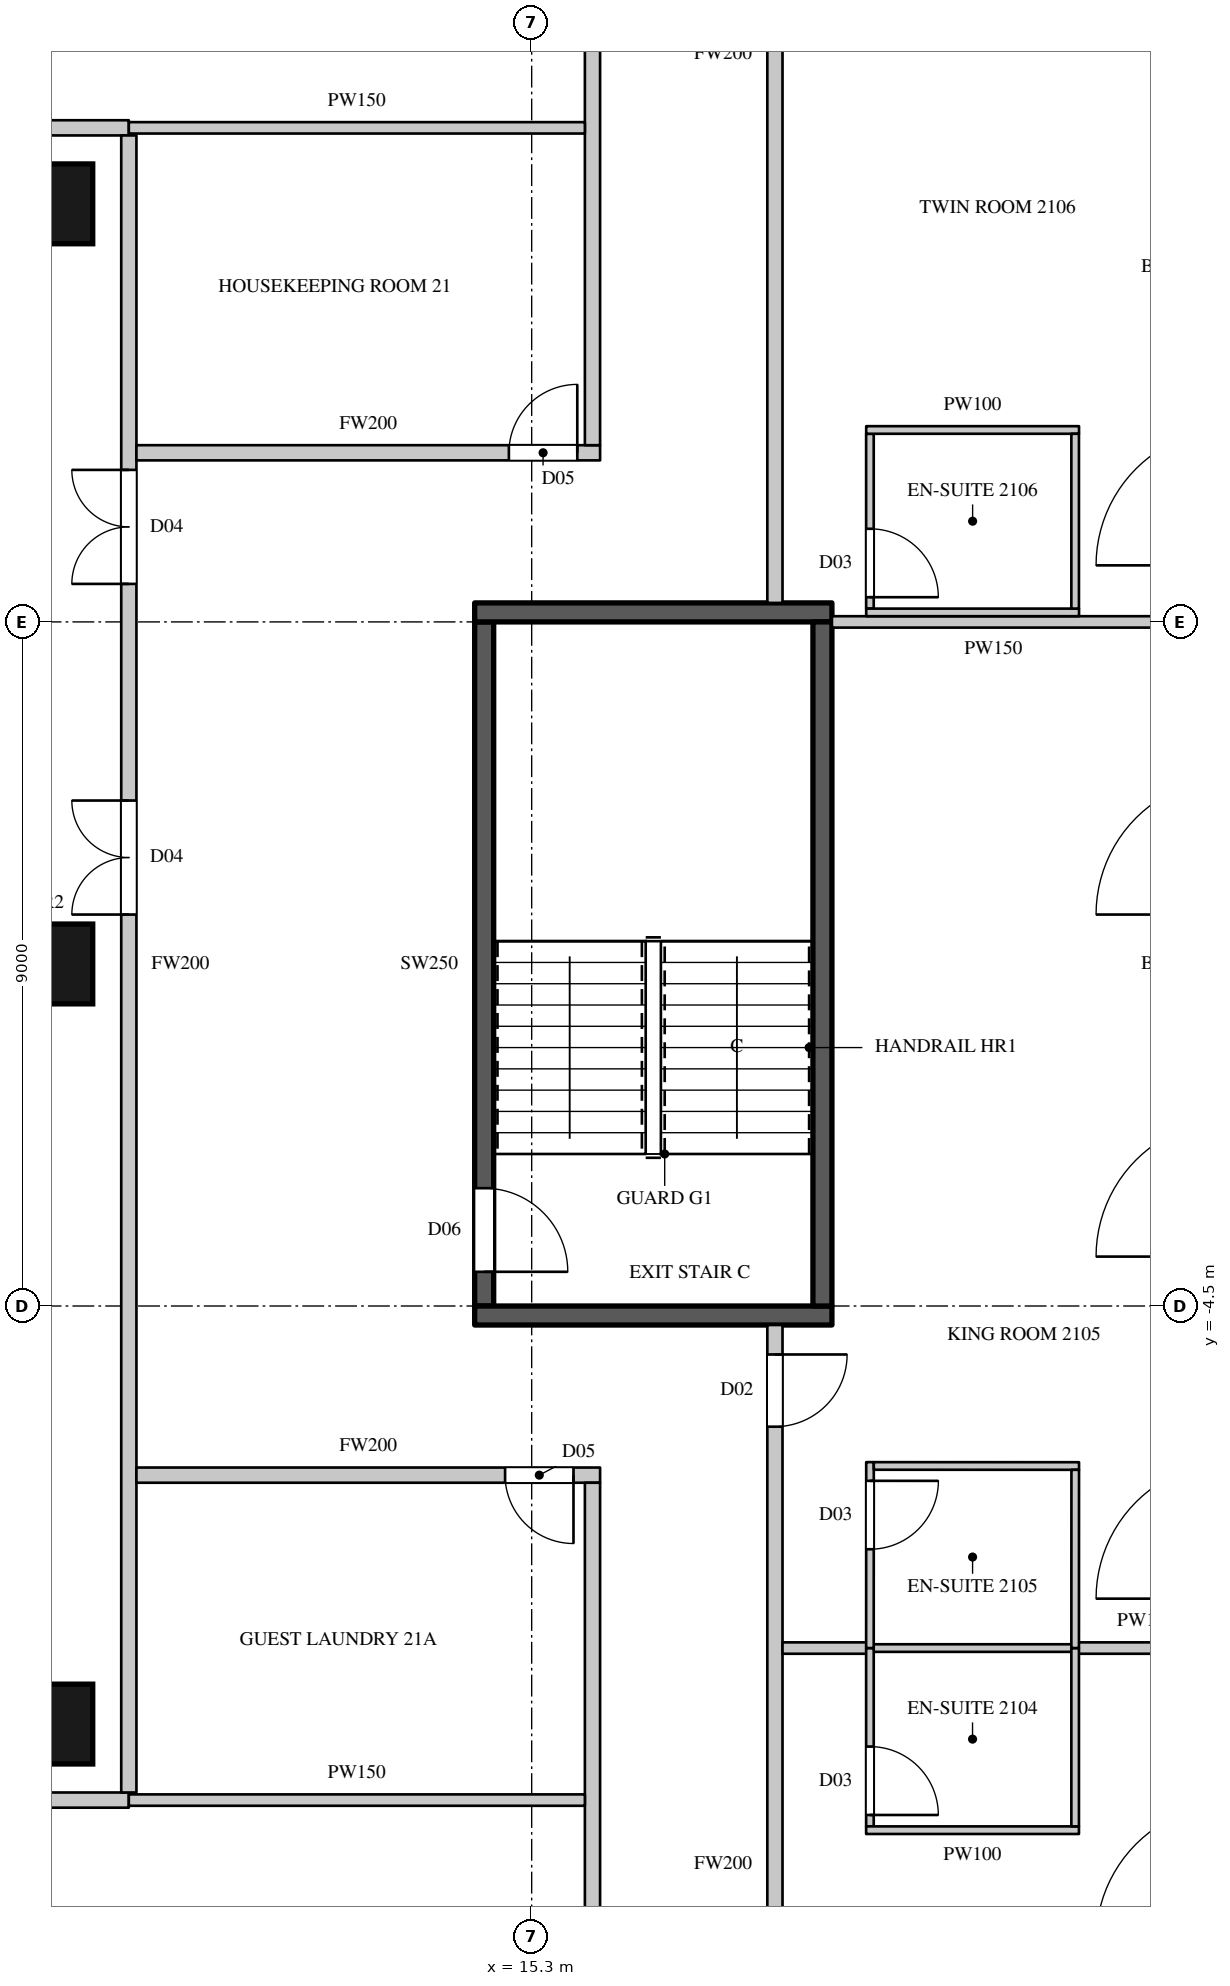
"""IFC4 building model, lengths in metres.
Left out: names, types, materials, properties, quantities, classifications, styles, units other than length and angle.
Written with IfcOpenShell. Run it as: python <this file> out.ifc"""

import sys

from ifc_helpers import new_model, si_unit, direction, frame, frame_2d, origin, origin_2d, place, context, subcontext, project, spatial, rectangle, circle, extrude, element, fill, save


model = new_model("IFC4")
c1 = context("Model", 3, precision=1e-05, world=origin(), true_north=direction((0.0, 1.0)))
c2 = subcontext(c1, "Body", "Model", "MODEL_VIEW")
j1 = project(units=[si_unit("LENGTHUNIT", "METRE"), si_unit("PLANEANGLEUNIT", "RADIAN")], contexts=[c1])
p1 = place(None, origin())
s1 = spatial("IfcSite", under=j1, at=p1, CompositionType="ELEMENT")
p2 = place(p1, origin())
s2 = spatial("IfcBuilding", under=s1, at=p2, CompositionType="ELEMENT")
p3 = place(p2, frame((0.0, 0.0, 105.9)))
s3 = spatial("IfcBuildingStorey", under=s2, at=p3, CompositionType="ELEMENT", Elevation=105.9)
for number, where, z_axis, x_axis in (
    (1, (9.0, -10.0, 0.0), (0.0, 0.0, 1.0), (1.0, 0.0, 0.0)),
    (2, (9.0, 0.0, 0.0), (0.0, 0.0, 1.0), (1.0, 0.0, 0.0)),
    (3, (9.0, 10.0, 0.0), (0.0, 0.0, 1.0), (1.0, 0.0, 0.0)),
):
    element("IfcColumn", number, at=place(p3, frame(where, z_axis=z_axis, x_axis=x_axis)), inside=s3, PredefinedType="COLUMN", context=c2, shape_type="SweptSolid", body=[
        extrude(circle(Radius=0.525, at=origin_2d()), origin(), (0.0, 0.0, 1.0), 3.6),
    ])
p4 = place(p3, frame((-8.1, -11.0, 0.0), z_axis=(0.0, 0.0, 1.0), x_axis=(1.0, 0.0, 0.0)))
e4 = element("IfcWall", 4, at=p4, inside=s3, PredefinedType="PARTITIONING", context=c2, shape_type="SweptSolid", body=[
    extrude(rectangle(XDim=18.1, YDim=0.2, at=frame_2d((9.05, 0.0))), origin(), (0.0, 0.0, 1.0), 3.3),
])
p5 = place(p4, frame((1.65, 0.0, 0.0)))
e5 = element("IfcOpeningElement", 5, at=p5, cuts=e4, PredefinedType="OPENING", context=c2, shape_type="SweptSolid", body=[
    extrude(rectangle(XDim=1.5, YDim=2.2, at=frame_2d((0.75, 1.1))), frame((0.0, 0.11, 0.0), z_axis=(0.0, -1.0, 0.0), x_axis=(1.0, 0.0, 0.0)), (0.0, 0.0, 1.0), 0.22),
])
p6 = place(p3, frame((-7.9, 11.0, 0.0), z_axis=(0.0, 0.0, 1.0), x_axis=(1.0, 0.0, 0.0)))
e6 = element("IfcWall", 6, at=p6, inside=s3, PredefinedType="PARTITIONING", context=c2, shape_type="SweptSolid", body=[
    extrude(rectangle(XDim=17.9, YDim=0.2, at=frame_2d((8.95, 0.0))), origin(), (0.0, 0.0, 1.0), 3.3),
])
p7 = place(p6, frame((6.5, 0.0, 0.0)))
e7 = element("IfcOpeningElement", 7, at=p7, cuts=e6, PredefinedType="OPENING", context=c2, shape_type="SweptSolid", body=[
    extrude(rectangle(XDim=1.5, YDim=2.2, at=frame_2d((0.75, 1.1))), frame((0.0, 0.11, 0.0), z_axis=(0.0, -1.0, 0.0), x_axis=(1.0, 0.0, 0.0)), (0.0, 0.0, 1.0), 0.22),
])
p8 = place(p3, frame((10.0, -10.9, 0.0), z_axis=(0.0, 0.0, 1.0), x_axis=(0.0, 1.0, 0.0)))
e8 = element("IfcWall", 8, at=p8, inside=s3, PredefinedType="PARTITIONING", context=c2, shape_type="SweptSolid", body=[
    extrude(rectangle(XDim=21.8, YDim=0.2, at=frame_2d((10.9, 0.0))), origin(), (0.0, 0.0, 1.0), 3.3),
])
p9 = place(p8, frame((15.9, 0.0, 0.0)))
e9 = element("IfcOpeningElement", 9, at=p9, cuts=e8, PredefinedType="OPENING", context=c2, shape_type="SweptSolid", body=[
    extrude(rectangle(XDim=1.5, YDim=2.2, at=frame_2d((0.75, 1.1))), frame((0.0, 0.11, 0.0), z_axis=(0.0, -1.0, 0.0), x_axis=(1.0, 0.0, 0.0)), (0.0, 0.0, 1.0), 0.22),
])
p10 = place(p8, frame((11.55, 0.0, 0.0)))
e10 = element("IfcOpeningElement", 10, at=p10, cuts=e8, PredefinedType="OPENING", context=c2, shape_type="SweptSolid", body=[
    extrude(rectangle(XDim=1.5, YDim=2.2, at=frame_2d((0.75, 1.1))), frame((0.0, 0.11, 0.0), z_axis=(0.0, -1.0, 0.0), x_axis=(1.0, 0.0, 0.0)), (0.0, 0.0, 1.0), 0.22),
])
p11 = place(p3, frame((10.1, -6.725, 0.0), z_axis=(0.0, 0.0, 1.0), x_axis=(1.0, 0.0, 0.0)))
e11 = element("IfcWall", 11, at=p11, inside=s3, PredefinedType="PARTITIONING", context=c2, shape_type="SweptSolid", body=[
    extrude(rectangle(XDim=6.1, YDim=0.2, at=frame_2d((3.05, 0.0))), origin(), (0.0, 0.0, 1.0), 3.3),
])
p12 = place(p11, frame((4.85, 0.0, 0.0)))
e12 = element("IfcOpeningElement", 12, at=p12, cuts=e11, PredefinedType="OPENING", context=c2, shape_type="SweptSolid", body=[
    extrude(rectangle(XDim=0.9, YDim=2.2, at=frame_2d((0.45, 1.1))), frame((0.0, 0.11, 0.0), z_axis=(0.0, -1.0, 0.0), x_axis=(1.0, 0.0, 0.0)), (0.0, 0.0, 1.0), 0.22),
])
p13 = place(p3, frame((10.1, 6.725, 0.0), z_axis=(0.0, 0.0, 1.0), x_axis=(1.0, 0.0, 0.0)))
e13 = element("IfcWall", 13, at=p13, inside=s3, PredefinedType="PARTITIONING", context=c2, shape_type="SweptSolid", body=[
    extrude(rectangle(XDim=6.1, YDim=0.2, at=frame_2d((3.05, 0.0))), origin(), (0.0, 0.0, 1.0), 3.3),
])
p14 = place(p13, frame((4.9, 0.0, 0.0)))
e14 = element("IfcOpeningElement", 14, at=p14, cuts=e13, PredefinedType="OPENING", context=c2, shape_type="SweptSolid", body=[
    extrude(rectangle(XDim=0.9, YDim=2.2, at=frame_2d((0.45, 1.1))), frame((0.0, 0.11, 0.0), z_axis=(0.0, -1.0, 0.0), x_axis=(1.0, 0.0, 0.0)), (0.0, 0.0, 1.0), 0.22),
])
for number, where, z_axis, x_axis in (
    (15, (16.1, -17.4, 0.0), (0.0, 0.0, 1.0), (0.0, 1.0, 0.0)),
    (16, (16.1, 6.825, 0.0), (0.0, 0.0, 1.0), (0.0, 1.0, 0.0)),
):
    element("IfcWall", number, at=place(p3, frame(where, z_axis=z_axis, x_axis=x_axis)), inside=s3, PredefinedType="PARTITIONING", context=c2, shape_type="SweptSolid", body=[
        extrude(rectangle(XDim=10.575, YDim=0.2, at=frame_2d((5.288, 0.0))), origin(), (0.0, 0.0, 1.0), 3.3),
    ])
p15 = place(p3, frame((18.5, -18.938, 0.0), z_axis=(0.0, 0.0, 1.0), x_axis=(0.0, 1.0, 0.0)))
e17 = element("IfcWall", 17, at=p15, inside=s3, PredefinedType="PARTITIONING", context=c2, shape_type="SweptSolid", body=[
    extrude(rectangle(XDim=14.188, YDim=0.2, at=frame_2d((7.094, 0.0))), origin(), (0.0, 0.0, 1.0), 3.3),
])
p16 = place(p15, frame((3.45, 0.0, 0.0)))
e18 = element("IfcOpeningElement", 18, at=p16, cuts=e17, PredefinedType="OPENING", context=c2, shape_type="SweptSolid", body=[
    extrude(rectangle(XDim=0.95, YDim=2.2, at=frame_2d((0.475, 1.1))), frame((0.0, 0.11, 0.0), z_axis=(0.0, -1.0, 0.0), x_axis=(1.0, 0.0, 0.0)), (0.0, 0.0, 1.0), 0.22),
])
p17 = place(p15, frame((12.85, 0.0, 0.0)))
e19 = element("IfcOpeningElement", 19, at=p17, cuts=e17, PredefinedType="OPENING", context=c2, shape_type="SweptSolid", body=[
    extrude(rectangle(XDim=0.95, YDim=2.2, at=frame_2d((0.475, 1.1))), frame((0.0, 0.11, 0.0), z_axis=(0.0, -1.0, 0.0), x_axis=(1.0, 0.0, 0.0)), (0.0, 0.0, 1.0), 0.22),
])
p18 = place(p3, frame((18.5, 4.75, 0.0), z_axis=(0.0, 0.0, 1.0), x_axis=(0.0, 1.0, 0.0)))
e20 = element("IfcWall", 20, at=p18, inside=s3, PredefinedType="PARTITIONING", context=c2, shape_type="SweptSolid", body=[
    extrude(rectangle(XDim=14.434, YDim=0.2, at=frame_2d((7.217, 0.0))), origin(), (0.0, 0.0, 1.0), 3.3),
])
p19 = place(p18, frame((7.65, 0.0, 0.0)))
e21 = element("IfcOpeningElement", 21, at=p19, cuts=e20, PredefinedType="OPENING", context=c2, shape_type="SweptSolid", body=[
    extrude(rectangle(XDim=0.95, YDim=2.2, at=frame_2d((0.475, 1.1))), frame((0.0, 0.11, 0.0), z_axis=(0.0, -1.0, 0.0), x_axis=(1.0, 0.0, 0.0)), (0.0, 0.0, 1.0), 0.22),
])
for number, where, z_axis, x_axis in (
    (22, (10.0, -11.0, 0.0), (0.0, 0.0, 1.0), (1.0, 0.0, 0.0)),
    (23, (10.0, 11.0, 0.0), (0.0, 0.0, 1.0), (1.0, 0.0, 0.0)),
):
    element("IfcWall", number, at=place(p3, frame(where, z_axis=z_axis, x_axis=x_axis)), inside=s3, PredefinedType="PARTITIONING", context=c2, shape_type="SweptSolid", body=[
        extrude(rectangle(XDim=6.0, YDim=0.15, at=frame_2d((3.0, 0.0))), origin(), (0.0, 0.0, 1.0), 3.3),
    ])
p20 = place(p3, frame((18.6, -9.0, 0.0), z_axis=(0.0, 0.0, 1.0), x_axis=(1.0, 0.0, 0.0)))
e24 = element("IfcWall", 24, at=p20, inside=s3, PredefinedType="PARTITIONING", context=c2, shape_type="SweptSolid", body=[
    extrude(rectangle(XDim=1.13, YDim=0.15, at=frame_2d((0.565, 0.0))), origin(), (0.0, 0.0, 1.0), 2.65),
])
p21 = place(p3, frame((19.25, 4.5, 0.0), z_axis=(0.0, 0.0, 1.0), x_axis=(1.0, 0.0, 0.0)))
e25 = element("IfcWall", 25, at=p21, inside=s3, PredefinedType="PARTITIONING", context=c2, shape_type="SweptSolid", body=[
    extrude(rectangle(XDim=4.25, YDim=0.15, at=frame_2d((2.125, 0.0))), origin(), (0.0, 0.0, 1.0), 3.3),
])
p22 = place(p3, frame((22.47, -9.0, 0.0), z_axis=(0.0, 0.0, 1.0), x_axis=(1.0, 0.0, 0.0)))
e26 = element("IfcWall", 26, at=p22, inside=s3, PredefinedType="PARTITIONING", context=c2, shape_type="SweptSolid", body=[
    extrude(rectangle(XDim=1.83, YDim=0.15, at=frame_2d((0.915, 0.0))), origin(), (0.0, 0.0, 1.0), 2.65),
])
p23 = place(p3, frame((14.675, -4.5, 0.0), z_axis=(0.0, 0.0, 1.0), x_axis=(0.0, 1.0, 0.0)))
e27 = element("IfcWall", 27, at=p23, inside=s3, PredefinedType="SHEAR", context=c2, shape_type="SweptSolid", body=[
    extrude(rectangle(XDim=9.0, YDim=0.25, at=frame_2d((4.5, 0.0))), origin(), (0.0, 0.0, 1.0), 3.3),
])
p24 = place(p23, frame((0.45, 0.0, 0.0)))
e28 = element("IfcOpeningElement", 28, at=p24, cuts=e27, PredefinedType="OPENING", context=c2, shape_type="SweptSolid", body=[
    extrude(rectangle(XDim=1.1, YDim=2.2, at=frame_2d((0.55, 1.1))), frame((0.0, 0.135, 0.0), z_axis=(0.0, -1.0, 0.0), x_axis=(1.0, 0.0, 0.0)), (0.0, 0.0, 1.0), 0.27),
])
for number, where, z_axis, x_axis in (
    (29, (14.55, -4.625, 0.0), (0.0, 0.0, 1.0), (1.0, 0.0, 0.0)),
    (30, (14.55, 4.625, 0.0), (0.0, 0.0, 1.0), (1.0, 0.0, 0.0)),
):
    element("IfcWall", number, at=place(p3, frame(where, z_axis=z_axis, x_axis=x_axis)), inside=s3, PredefinedType="SHEAR", context=c2, shape_type="SweptSolid", body=[
        extrude(rectangle(XDim=4.7, YDim=0.25, at=frame_2d((2.35, 0.0))), origin(), (0.0, 0.0, 1.0), 3.3),
    ])
p25 = place(p3, frame((19.125, -4.5, 0.0), z_axis=(0.0, 0.0, 1.0), x_axis=(0.0, 1.0, 0.0)))
e31 = element("IfcWall", 31, at=p25, inside=s3, PredefinedType="SHEAR", context=c2, shape_type="SweptSolid", body=[
    extrude(rectangle(XDim=9.0, YDim=0.25, at=frame_2d((4.5, 0.0))), origin(), (0.0, 0.0, 1.0), 3.3),
])
p26 = place(p3, frame((19.73, -9.0, 0.0), z_axis=(0.0, 0.0, 1.0), x_axis=(1.0, 0.0, 0.0)))
e32 = element("IfcWall", 32, at=p26, inside=s3, PredefinedType="PARTITIONING", context=c2, shape_type="SweptSolid", body=[
    extrude(rectangle(XDim=2.74, YDim=0.1, at=frame_2d((1.37, 0.0))), origin(), (0.0, 0.0, 1.0), 2.65),
])
p27 = place(p3, frame((19.75, -11.346, 0.0), z_axis=(0.0, 0.0, 1.0), x_axis=(0.0, 1.0, 0.0)))
e33 = element("IfcWall", 33, at=p27, inside=s3, PredefinedType="PARTITIONING", context=c2, shape_type="SweptSolid", body=[
    extrude(rectangle(XDim=2.346, YDim=0.1, at=frame_2d((1.173, 0.0))), origin(), (0.0, 0.0, 1.0), 3.3),
])
p28 = place(p27, frame((0.15, 0.0, 0.0)))
e34 = element("IfcOpeningElement", 34, at=p28, cuts=e33, PredefinedType="OPENING", context=c2, shape_type="SweptSolid", body=[
    extrude(rectangle(XDim=0.9, YDim=2.2, at=frame_2d((0.45, 1.1))), frame((0.0, 0.06, 0.0), z_axis=(0.0, -1.0, 0.0), x_axis=(1.0, 0.0, 0.0)), (0.0, 0.0, 1.0), 0.12),
])
p29 = place(p3, frame((19.7, -11.396, 0.0), z_axis=(0.0, 0.0, 1.0), x_axis=(1.0, 0.0, 0.0)))
e35 = element("IfcWall", 35, at=p29, inside=s3, PredefinedType="PARTITIONING", context=c2, shape_type="SweptSolid", body=[
    extrude(rectangle(XDim=2.8, YDim=0.1, at=frame_2d((1.4, 0.0))), origin(), (0.0, 0.0, 1.0), 3.3),
])
p30 = place(p3, frame((19.75, -9.0, 0.0), z_axis=(0.0, 0.0, 1.0), x_axis=(0.000399241409, 0.999999920303, 0.0)))
e36 = element("IfcWall", 36, at=p30, inside=s3, PredefinedType="PARTITIONING", context=c2, shape_type="SweptSolid", body=[
    extrude(rectangle(XDim=2.446, YDim=0.1, at=frame_2d((1.223, 0.0))), origin(), (0.0, 0.0, 1.0), 3.3),
])
p31 = place(p30, frame((1.3, 0.0, 0.0)))
e37 = element("IfcOpeningElement", 37, at=p31, cuts=e36, PredefinedType="OPENING", context=c2, shape_type="SweptSolid", body=[
    extrude(rectangle(XDim=0.9, YDim=2.2, at=frame_2d((0.45, 1.1))), frame((0.0, 0.06, 0.0), z_axis=(0.0, -1.0, 0.0), x_axis=(1.0, 0.0, 0.0)), (0.0, 0.0, 1.0), 0.12),
])
p32 = place(p3, frame((19.75, 4.675, 0.0), z_axis=(0.0, 0.0, 1.0), x_axis=(0.0, 1.0, 0.0)))
e38 = element("IfcWall", 38, at=p32, inside=s3, PredefinedType="PARTITIONING", context=c2, shape_type="SweptSolid", body=[
    extrude(rectangle(XDim=2.3, YDim=0.1, at=frame_2d((1.15, 0.0))), origin(), (0.0, 0.0, 1.0), 3.3),
])
p33 = place(p32, frame((0.15, 0.0, 0.0)))
e39 = element("IfcOpeningElement", 39, at=p33, cuts=e38, PredefinedType="OPENING", context=c2, shape_type="SweptSolid", body=[
    extrude(rectangle(XDim=0.9, YDim=2.2, at=frame_2d((0.45, 1.1))), frame((0.0, 0.06, 0.0), z_axis=(0.0, -1.0, 0.0), x_axis=(1.0, 0.0, 0.0)), (0.0, 0.0, 1.0), 0.12),
])
p34 = place(p3, frame((19.801, -6.604, 0.0), z_axis=(0.0, 0.0, 1.0), x_axis=(0.999999934588, -0.000361696332, 0.0)))
e40 = element("IfcWall", 40, at=p34, inside=s3, PredefinedType="PARTITIONING", context=c2, shape_type="SweptSolid", body=[
    extrude(rectangle(XDim=2.7, YDim=0.1, at=frame_2d((1.35, 0.0))), origin(), (0.0, 0.0, 1.0), 3.3),
])
for number, where, z_axis, x_axis in (
    (41, (19.701, 4.625, 0.0), (0.0, 0.0, 1.0), (1.0, 0.0, 0.0)),
    (42, (19.701, 7.025, 0.0), (0.0, 0.0, 1.0), (1.0, 0.0, 0.0)),
):
    element("IfcWall", number, at=place(p3, frame(where, z_axis=z_axis, x_axis=x_axis)), inside=s3, PredefinedType="PARTITIONING", context=c2, shape_type="SweptSolid", body=[
        extrude(rectangle(XDim=2.8, YDim=0.1, at=frame_2d((1.4, 0.0))), origin(), (0.0, 0.0, 1.0), 3.3),
    ])
p35 = place(p3, frame((22.45, -11.346, 0.0), z_axis=(0.0, 0.0, 1.0), x_axis=(0.0, 1.0, 0.0)))
e43 = element("IfcWall", 43, at=p35, inside=s3, PredefinedType="PARTITIONING", context=c2, shape_type="SweptSolid", body=[
    extrude(rectangle(XDim=2.346, YDim=0.1, at=frame_2d((1.173, 0.0))), origin(), (0.0, 0.0, 1.0), 3.3),
])
p36 = place(p3, frame((22.45, -9.0, 0.0), z_axis=(0.0, 0.0, 1.0), x_axis=(0.00041644973, 0.999999913285, 0.0)))
e44 = element("IfcWall", 44, at=p36, inside=s3, PredefinedType="PARTITIONING", context=c2, shape_type="SweptSolid", body=[
    extrude(rectangle(XDim=2.345, YDim=0.1, at=frame_2d((1.172, 0.0))), origin(), (0.0, 0.0, 1.0), 3.3),
])
p37 = place(p3, frame((22.45, 4.675, 0.0), z_axis=(0.0, 0.0, 1.0), x_axis=(0.0, 1.0, 0.0)))
e45 = element("IfcWall", 45, at=p37, inside=s3, PredefinedType="PARTITIONING", context=c2, shape_type="SweptSolid", body=[
    extrude(rectangle(XDim=2.3, YDim=0.1, at=frame_2d((1.15, 0.0))), origin(), (0.0, 0.0, 1.0), 3.3),
])
p38 = place(p9, origin())
e46 = element("IfcDoor", 46, at=p38, inside=s3, OperationType="DOUBLE_DOOR_SINGLE_SWING", PredefinedType="DOOR", context=c2, shape_type="SweptSolid", body=[
    extrude(rectangle(XDim=1.5, YDim=2.2, at=frame_2d((0.75, 1.1))), frame((0.0, 0.025, 0.0), z_axis=(0.0, -1.0, 0.0), x_axis=(1.0, 0.0, 0.0)), (0.0, 0.0, 1.0), 0.05),
])
fill(e9, e46)
p39 = place(p10, origin())
e47 = element("IfcDoor", 47, at=p39, inside=s3, OperationType="DOUBLE_DOOR_SINGLE_SWING", PredefinedType="DOOR", context=c2, shape_type="SweptSolid", body=[
    extrude(rectangle(XDim=1.5, YDim=2.2, at=frame_2d((0.75, 1.1))), frame((0.0, 0.025, 0.0), z_axis=(0.0, -1.0, 0.0), x_axis=(1.0, 0.0, 0.0)), (0.0, 0.0, 1.0), 0.05),
])
fill(e10, e47)
p40 = place(p12, origin())
e48 = element("IfcDoor", 48, at=p40, inside=s3, OperationType="SINGLE_SWING_LEFT", PredefinedType="DOOR", context=c2, shape_type="SweptSolid", body=[
    extrude(rectangle(XDim=0.9, YDim=2.2, at=frame_2d((0.45, 1.1))), frame((0.0, 0.025, 0.0), z_axis=(0.0, -1.0, 0.0), x_axis=(1.0, 0.0, 0.0)), (0.0, 0.0, 1.0), 0.05),
])
fill(e12, e48)
p41 = place(p14, origin())
e49 = element("IfcDoor", 49, at=p41, inside=s3, OperationType="SINGLE_SWING_RIGHT", PredefinedType="DOOR", context=c2, shape_type="SweptSolid", body=[
    extrude(rectangle(XDim=0.9, YDim=2.2, at=frame_2d((0.45, 1.1))), frame((0.0, 0.025, 0.0), z_axis=(0.0, -1.0, 0.0), x_axis=(1.0, 0.0, 0.0)), (0.0, 0.0, 1.0), 0.05),
])
fill(e14, e49)
p42 = place(p28, origin())
e50 = element("IfcDoor", 50, at=p42, inside=s3, OperationType="SINGLE_SWING_RIGHT", PredefinedType="DOOR", context=c2, shape_type="SweptSolid", body=[
    extrude(rectangle(XDim=0.9, YDim=2.2, at=frame_2d((0.45, 1.1))), frame((0.0, 0.025, 0.0), z_axis=(0.0, -1.0, 0.0), x_axis=(1.0, 0.0, 0.0)), (0.0, 0.0, 1.0), 0.05),
])
fill(e34, e50)
p43 = place(p17, origin())
e51 = element("IfcDoor", 51, at=p43, inside=s3, OperationType="SINGLE_SWING_LEFT", PredefinedType="DOOR", context=c2, shape_type="SweptSolid", body=[
    extrude(rectangle(XDim=0.95, YDim=2.2, at=frame_2d((0.475, 1.1))), frame((0.0, 0.025, 0.0), z_axis=(0.0, -1.0, 0.0), x_axis=(1.0, 0.0, 0.0)), (0.0, 0.0, 1.0), 0.05),
])
fill(e19, e51)
p44 = place(p31, origin())
e52 = element("IfcDoor", 52, at=p44, inside=s3, OperationType="SINGLE_SWING_LEFT", PredefinedType="DOOR", context=c2, shape_type="SweptSolid", body=[
    extrude(rectangle(XDim=0.9, YDim=2.2, at=frame_2d((0.45, 1.1))), frame((0.0, 0.025, 0.0), z_axis=(0.0, -1.0, 0.0), x_axis=(1.0, 0.0, 0.0)), (0.0, 0.0, 1.0), 0.05),
])
fill(e37, e52)
p45 = place(p33, origin())
e53 = element("IfcDoor", 53, at=p45, inside=s3, OperationType="SINGLE_SWING_RIGHT", PredefinedType="DOOR", context=c2, shape_type="SweptSolid", body=[
    extrude(rectangle(XDim=0.9, YDim=2.2, at=frame_2d((0.45, 1.1))), frame((0.0, 0.025, 0.0), z_axis=(0.0, -1.0, 0.0), x_axis=(1.0, 0.0, 0.0)), (0.0, 0.0, 1.0), 0.05),
])
fill(e39, e53)
p46 = place(p24, origin())
e54 = element("IfcDoor", 54, at=p46, inside=s3, OperationType="SINGLE_SWING_RIGHT", PredefinedType="DOOR", context=c2, shape_type="SweptSolid", body=[
    extrude(rectangle(XDim=1.1, YDim=2.2, at=frame_2d((0.55, 1.1))), frame((0.0, 0.025, 0.0), z_axis=(0.0, -1.0, 0.0), x_axis=(1.0, 0.0, 0.0)), (0.0, 0.0, 1.0), 0.05),
])
fill(e28, e54)
save(model, sys.argv[1])
